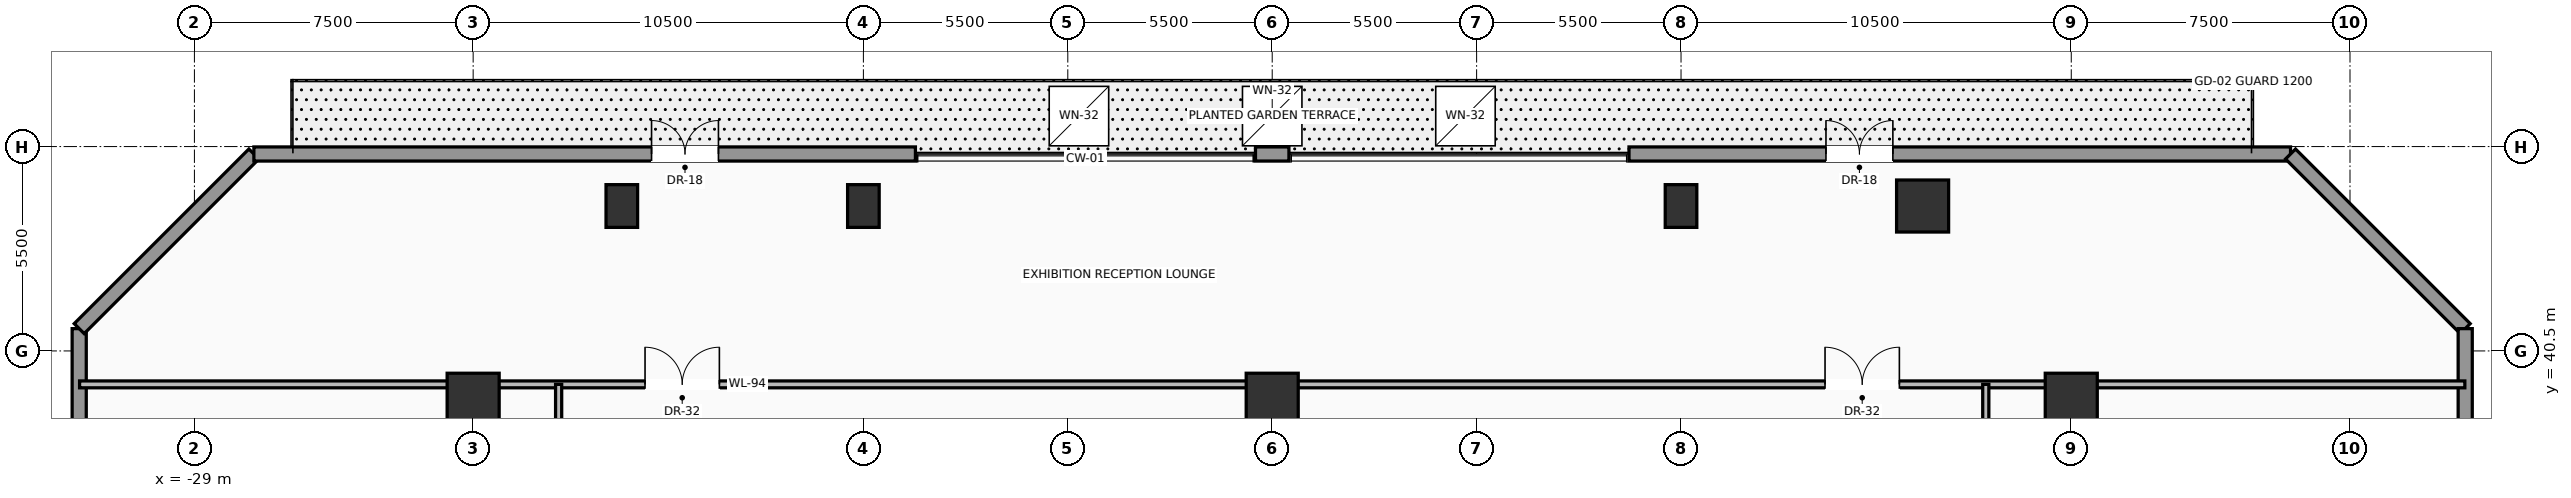
"""IFC4 building model, lengths in metres.
Left out: names, types, materials, properties, quantities, classifications, styles, units other than length and angle.
Written with IfcOpenShell. Run it as: python <this file> out.ifc"""

import sys

from ifc_helpers import new_model, si_unit, direction, frame, frame_2d, origin, origin_2d, place, context, subcontext, project, spatial, rectangle, hollow_rectangle, extrude, source, transform, mapped, element, fill, save


model = new_model("IFC4")
c1 = context("Model", 3, precision=1e-05, world=origin(), true_north=direction((0.0, 1.0)))
c2 = subcontext(c1, "Body", "Model", "MODEL_VIEW")
j1 = project(units=[si_unit("LENGTHUNIT", "METRE"), si_unit("PLANEANGLEUNIT", "RADIAN")], contexts=[c1])
p1 = place(None, origin())
s1 = spatial("IfcSite", under=j1, at=p1, CompositionType="ELEMENT")
p2 = place(p1, origin())
s2 = spatial("IfcBuilding", under=s1, at=p2, CompositionType="ELEMENT")
p3 = place(p2, frame((0.0, 0.0, 11.0)))
s3 = spatial("IfcBuildingStorey", under=s2, at=p3, CompositionType="ELEMENT", Elevation=11.0)
m1 = source(origin(), c2, "Body", "SweptSolid", [
    extrude(hollow_rectangle(XDim=1.4, YDim=1.4, WallThickness=0.07, at=origin_2d()), origin(), (0.0, 0.0, 1.0), 5.5),
])
p4 = place(p3, frame((-21.5, 39.2, 0.0), z_axis=(0.0, 0.0, 1.0), x_axis=(1.0, 0.0, 0.0)))
e1 = element("IfcColumn", 1, at=p4, inside=s3, PredefinedType="COLUMN", context=c2, shape_type="MappedRepresentation", body=[
    mapped(m1, transform((0.0, 0.0, 0.0), scale=1.0)),
])
m2 = source(origin(), c2, "Body", "SweptSolid", [
    extrude(rectangle(XDim=0.85, YDim=1.15, at=origin_2d()), origin(), (0.0, 0.0, 1.0), 5.5),
])
p5 = place(p3, frame((-11.0, 44.4, 0.0), z_axis=(0.0, 0.0, 1.0), x_axis=(1.0, 0.0, 0.0)))
e2 = element("IfcColumn", 2, at=p5, inside=s3, PredefinedType="COLUMN", context=c2, shape_type="MappedRepresentation", body=[
    mapped(m2, transform((0.0, 0.0, 0.0), scale=1.0)),
])
p6 = place(p3, frame((0.0, 39.2, 0.0), z_axis=(0.0, 0.0, 1.0), x_axis=(1.0, 0.0, 0.0)))
e3 = element("IfcColumn", 3, at=p6, inside=s3, PredefinedType="COLUMN", context=c2, shape_type="MappedRepresentation", body=[
    mapped(m1, transform((0.0, 0.0, 0.0), scale=1.0)),
])
p7 = place(p3, frame((11.0, 44.4, 0.0), z_axis=(0.0, 0.0, 1.0), x_axis=(1.0, 0.0, 0.0)))
e4 = element("IfcColumn", 4, at=p7, inside=s3, PredefinedType="COLUMN", context=c2, shape_type="MappedRepresentation", body=[
    mapped(m2, transform((0.0, 0.0, 0.0), scale=1.0)),
])
p8 = place(p3, frame((21.5, 39.2, 0.0), z_axis=(0.0, 0.0, 1.0), x_axis=(1.0, 0.0, 0.0)))
e5 = element("IfcColumn", 5, at=p8, inside=s3, PredefinedType="COLUMN", context=c2, shape_type="MappedRepresentation", body=[
    mapped(m1, transform((0.0, 0.0, 0.0), scale=1.0)),
])
p9 = place(p3, frame((-17.5, 44.4, 0.0), z_axis=(0.0, 0.0, 1.0), x_axis=(1.0, 0.0, 0.0)))
e6 = element("IfcColumn", 6, at=p9, inside=s3, PredefinedType="COLUMN", context=c2, shape_type="MappedRepresentation", body=[
    mapped(m2, transform((0.0, 0.0, 0.0), scale=1.0)),
])
p10 = place(p3, frame((17.5, 44.4, 0.0), z_axis=(0.0, 0.0, 1.0), x_axis=(1.0, 0.0, 0.0)))
e7 = element("IfcColumn", 7, at=p10, inside=s3, PredefinedType="COLUMN", context=c2, shape_type="MappedRepresentation", body=[
    mapped(m1, transform((0.0, 0.0, 0.0), scale=1.0)),
])
p11 = place(p3, frame((-32.1, 4.7, 0.0), z_axis=(0.0, 0.0, 1.0), x_axis=(0.0, 1.0, 0.0)))
e8 = element("IfcWall", 8, at=p11, inside=s3, PredefinedType="SOLIDWALL", context=c2, shape_type="SweptSolid", body=[
    extrude(rectangle(XDim=36.4, YDim=0.38, at=frame_2d((18.2, 0.0))), origin(), (0.0, 0.0, 1.0), 4.125),
])
p12 = place(p11, frame((16.9, 0.0, 0.95)))
e9 = element("IfcOpeningElement", 9, at=p12, cuts=e8, PredefinedType="OPENING", context=c2, shape_type="SweptSolid", body=[
    extrude(rectangle(XDim=1.8, YDim=2.4, at=frame_2d((0.9, 1.2))), frame((0.0, 0.2, 0.0), z_axis=(0.0, -1.0, 0.0), x_axis=(1.0, 0.0, 0.0)), (0.0, 0.0, 1.0), 0.4),
])
p13 = place(p11, frame((27.4, 0.0, 0.95)))
e10 = element("IfcOpeningElement", 10, at=p13, cuts=e8, PredefinedType="OPENING", context=c2, shape_type="SweptSolid", body=[
    extrude(rectangle(XDim=1.8, YDim=2.4, at=frame_2d((0.9, 1.2))), frame((0.0, 0.2, 0.0), z_axis=(0.0, -1.0, 0.0), x_axis=(1.0, 0.0, 0.0)), (0.0, 0.0, 1.0), 0.4),
])
p14 = place(p3, frame((-32.1, 41.1, 0.0), z_axis=(0.0, 0.0, 1.0), x_axis=(0.707125145927, 0.707088415969, 0.0)))
e11 = element("IfcWall", 11, at=p14, inside=s3, PredefinedType="SOLIDWALL", context=c2, shape_type="SweptSolid", body=[
    extrude(rectangle(XDim=6.647, YDim=0.38, at=frame_2d((3.323, 0.0))), origin(), (0.0, 0.0, 1.0), 4.125),
])
p15 = place(p3, frame((-0.45, 45.8, 0.0), z_axis=(0.0, 0.0, 1.0), x_axis=(1.0, 0.0, 0.0)))
e12 = element("IfcWall", 12, at=p15, inside=s3, PredefinedType="SOLIDWALL", context=c2, shape_type="SweptSolid", body=[
    extrude(rectangle(XDim=0.9, YDim=0.38, at=frame_2d((0.45, 0.0))), origin(), (0.0, 0.0, 1.0), 4.125),
])
p16 = place(p3, frame((-27.4, 45.8, 0.0), z_axis=(0.0, 0.0, 1.0), x_axis=(1.0, 0.0, 0.0)))
e13 = element("IfcWall", 13, at=p16, inside=s3, PredefinedType="SOLIDWALL", context=c2, shape_type="SweptSolid", body=[
    extrude(rectangle(XDim=17.8, YDim=0.38, at=frame_2d((8.9, 0.0))), origin(), (0.0, 0.0, 1.0), 4.125),
])
p17 = place(p16, frame((10.7, 0.0, 0.0)))
e14 = element("IfcOpeningElement", 14, at=p17, cuts=e13, PredefinedType="OPENING", context=c2, shape_type="SweptSolid", body=[
    extrude(rectangle(XDim=1.8, YDim=2.4, at=frame_2d((0.9, 1.2))), frame((0.0, 0.2, 0.0), z_axis=(0.0, -1.0, 0.0), x_axis=(1.0, 0.0, 0.0)), (0.0, 0.0, 1.0), 0.4),
])
p18 = place(p3, frame((9.6, 45.8, 0.0), z_axis=(0.0, 0.0, 1.0), x_axis=(1.0, 0.0, 0.0)))
e15 = element("IfcWall", 15, at=p18, inside=s3, PredefinedType="SOLIDWALL", context=c2, shape_type="SweptSolid", body=[
    extrude(rectangle(XDim=17.8, YDim=0.38, at=frame_2d((8.9, 0.0))), origin(), (0.0, 0.0, 1.0), 4.125),
])
p19 = place(p18, frame((5.3, 0.0, 0.0)))
e16 = element("IfcOpeningElement", 16, at=p19, cuts=e15, PredefinedType="OPENING", context=c2, shape_type="SweptSolid", body=[
    extrude(rectangle(XDim=1.8, YDim=2.4, at=frame_2d((0.9, 1.2))), frame((0.0, 0.2, 0.0), z_axis=(0.0, -1.0, 0.0), x_axis=(1.0, 0.0, 0.0)), (0.0, 0.0, 1.0), 0.4),
])
p20 = place(p3, frame((27.4, 45.8, 0.0), z_axis=(0.0, 0.0, 1.0), x_axis=(0.707125145927, -0.707088415969, 0.0)))
e17 = element("IfcWall", 17, at=p20, inside=s3, PredefinedType="SOLIDWALL", context=c2, shape_type="SweptSolid", body=[
    extrude(rectangle(XDim=6.647, YDim=0.38, at=frame_2d((3.323, 0.0))), origin(), (0.0, 0.0, 1.0), 4.125),
])
p21 = place(p3, frame((32.1, 41.1, 0.0), z_axis=(0.0, 0.0, 1.0), x_axis=(0.0, -1.0, 0.0)))
e18 = element("IfcWall", 18, at=p21, inside=s3, PredefinedType="SOLIDWALL", context=c2, shape_type="SweptSolid", body=[
    extrude(rectangle(XDim=36.4, YDim=0.38, at=frame_2d((18.2, 0.0))), origin(), (0.0, 0.0, 1.0), 4.125),
])
p22 = place(p21, frame((17.7, 0.0, 0.95)))
e19 = element("IfcOpeningElement", 19, at=p22, cuts=e18, PredefinedType="OPENING", context=c2, shape_type="SweptSolid", body=[
    extrude(rectangle(XDim=1.8, YDim=2.4, at=frame_2d((0.9, 1.2))), frame((0.0, 0.2, 0.0), z_axis=(0.0, -1.0, 0.0), x_axis=(1.0, 0.0, 0.0)), (0.0, 0.0, 1.0), 0.4),
])
p23 = place(p21, frame((7.2, 0.0, 0.95)))
e20 = element("IfcOpeningElement", 20, at=p23, cuts=e18, PredefinedType="OPENING", context=c2, shape_type="SweptSolid", body=[
    extrude(rectangle(XDim=1.8, YDim=2.4, at=frame_2d((0.9, 1.2))), frame((0.0, 0.2, 0.0), z_axis=(0.0, -1.0, 0.0), x_axis=(1.0, 0.0, 0.0)), (0.0, 0.0, 1.0), 0.4),
])
p24 = place(p3, frame((-32.09, 39.6, 0.0), z_axis=(0.0, 0.0, 1.0), x_axis=(1.0, 0.0, 0.0)))
e21 = element("IfcWall", 21, at=p24, inside=s3, PredefinedType="PARTITIONING", context=c2, shape_type="SweptSolid", body=[
    extrude(rectangle(XDim=64.18, YDim=0.185, at=frame_2d((32.09, 0.0))), origin(), (0.0, 0.0, 1.0), 4.137),
])
p25 = place(p24, frame((15.215, 0.0, 0.0)))
e22 = element("IfcOpeningElement", 22, at=p25, cuts=e21, PredefinedType="OPENING", context=c2, shape_type="SweptSolid", body=[
    extrude(rectangle(XDim=2.0, YDim=2.4, at=frame_2d((1.0, 1.2))), frame((0.0, 0.103, 0.0), z_axis=(0.0, -1.0, 0.0), x_axis=(1.0, 0.0, 0.0)), (0.0, 0.0, 1.0), 0.205),
])
p26 = place(p24, frame((46.965, 0.0, 0.0)))
e23 = element("IfcOpeningElement", 23, at=p26, cuts=e21, PredefinedType="OPENING", context=c2, shape_type="SweptSolid", body=[
    extrude(rectangle(XDim=2.0, YDim=2.4, at=frame_2d((1.0, 1.2))), frame((0.0, 0.103, 0.0), z_axis=(0.0, -1.0, 0.0), x_axis=(1.0, 0.0, 0.0)), (0.0, 0.0, 1.0), 0.205),
])
p27 = place(p3, frame((-19.2, 19.2, 0.0), z_axis=(0.0, 0.0, 1.0), x_axis=(0.0, 1.0, 0.0)))
e24 = element("IfcWall", 24, at=p27, inside=s3, PredefinedType="PARTITIONING", context=c2, shape_type="SweptSolid", body=[
    extrude(rectangle(XDim=20.4, YDim=0.165, at=frame_2d((10.2, 0.0))), origin(), (0.0, 0.0, 1.0), 4.137),
])
p28 = place(p27, frame((8.464, 0.0, 0.0)))
e25 = element("IfcOpeningElement", 25, at=p28, cuts=e24, PredefinedType="OPENING", context=c2, shape_type="SweptSolid", body=[
    extrude(rectangle(XDim=1.5, YDim=2.25, at=frame_2d((0.75, 1.125))), frame((0.0, 0.093, 0.0), z_axis=(0.0, -1.0, 0.0), x_axis=(1.0, 0.0, 0.0)), (0.0, 0.0, 1.0), 0.185),
])
p29 = place(p3, frame((19.2, 19.2, 0.0), z_axis=(0.0, 0.0, 1.0), x_axis=(0.0, 1.0, 0.0)))
e26 = element("IfcWall", 26, at=p29, inside=s3, PredefinedType="PARTITIONING", context=c2, shape_type="SweptSolid", body=[
    extrude(rectangle(XDim=20.4, YDim=0.165, at=frame_2d((10.2, 0.0))), origin(), (0.0, 0.0, 1.0), 4.137),
])
p30 = place(p29, frame((8.464, 0.0, 0.0)))
e27 = element("IfcOpeningElement", 27, at=p30, cuts=e26, PredefinedType="OPENING", context=c2, shape_type="SweptSolid", body=[
    extrude(rectangle(XDim=1.5, YDim=2.25, at=frame_2d((0.75, 1.125))), frame((0.0, 0.093, 0.0), z_axis=(0.0, -1.0, 0.0), x_axis=(1.0, 0.0, 0.0)), (0.0, 0.0, 1.0), 0.185),
])
p31 = place(p3, frame((0.0, 19.2, 0.0), z_axis=(0.0, 0.0, 1.0), x_axis=(0.0, 1.0, 0.0)))
e28 = element("IfcWall", 28, at=p31, inside=s3, PredefinedType="MOVABLE", context=c2, shape_type="SweptSolid", body=[
    extrude(rectangle(XDim=20.4, YDim=0.155, at=frame_2d((10.2, 0.0))), origin(), (0.0, 0.0, 1.0), 4.137),
])
p32 = place(p31, frame((9.45, 0.0, 0.0)))
e29 = element("IfcOpeningElement", 29, at=p32, cuts=e28, PredefinedType="OPENING", context=c2, shape_type="SweptSolid", body=[
    extrude(rectangle(XDim=1.5, YDim=2.25, at=frame_2d((0.75, 1.125))), frame((0.0, 0.087, 0.0), z_axis=(0.0, -1.0, 0.0), x_axis=(1.0, 0.0, 0.0)), (0.0, 0.0, 1.0), 0.175),
])
m3 = source(origin(), c2, "Body", "SweptSolid", [
    extrude(rectangle(XDim=1.8, YDim=2.4, at=frame_2d((0.9, 1.2))), frame((0.0, 0.025, 0.0), z_axis=(0.0, -1.0, 0.0), x_axis=(1.0, 0.0, 0.0)), (0.0, 0.0, 1.0), 0.05),
])
p33 = place(p17, origin())
e30 = element("IfcDoor", 30, at=p33, inside=s3, OperationType="DOUBLE_DOOR_SINGLE_SWING", PredefinedType="DOOR", context=c2, shape_type="MappedRepresentation", body=[
    mapped(m3, transform((0.0, 0.0, 0.0), scale=1.0)),
])
fill(e14, e30)
p34 = place(p19, origin())
e31 = element("IfcDoor", 31, at=p34, inside=s3, OperationType="DOUBLE_DOOR_SINGLE_SWING", PredefinedType="DOOR", context=c2, shape_type="MappedRepresentation", body=[
    mapped(m3, transform((0.0, 0.0, 0.0), scale=1.0)),
])
fill(e16, e31)
p35 = place(p3, frame((0.0, 0.0, -0.33)))
p36 = place(p35, frame((-5.2, 46.82, 0.28)))
e32 = element("IfcWindow", 32, at=p36, inside=s3, PartitioningType="SINGLE_PANEL", PredefinedType="SKYLIGHT", context=c2, shape_type="SweptSolid", body=[
    extrude(rectangle(XDim=1.6, YDim=1.6, at=origin_2d()), origin(), (0.0, 0.0, 1.0), 0.05),
])
p37 = place(p35, frame((0.0, 46.82, 0.28)))
e33 = element("IfcWindow", 33, at=p37, inside=s3, PartitioningType="SINGLE_PANEL", PredefinedType="SKYLIGHT", context=c2, shape_type="SweptSolid", body=[
    extrude(rectangle(XDim=1.6, YDim=1.6, at=origin_2d()), origin(), (0.0, 0.0, 1.0), 0.05),
])
p38 = place(p35, frame((5.2, 46.82, 0.28)))
e34 = element("IfcWindow", 34, at=p38, inside=s3, PartitioningType="SINGLE_PANEL", PredefinedType="SKYLIGHT", context=c2, shape_type="SweptSolid", body=[
    extrude(rectangle(XDim=1.6, YDim=1.6, at=origin_2d()), origin(), (0.0, 0.0, 1.0), 0.05),
])
m4 = source(origin(), c2, "Body", "SweptSolid", [
    extrude(rectangle(XDim=2.0, YDim=2.4, at=frame_2d((1.0, 1.2))), frame((0.0, 0.025, 0.0), z_axis=(0.0, -1.0, 0.0), x_axis=(1.0, 0.0, 0.0)), (0.0, 0.0, 1.0), 0.05),
])
p39 = place(p25, origin())
e35 = element("IfcDoor", 35, at=p39, inside=s3, OperationType="DOUBLE_DOOR_SINGLE_SWING", PredefinedType="DOOR", context=c2, shape_type="MappedRepresentation", body=[
    mapped(m4, transform((0.0, 0.0, 0.0), scale=1.0)),
])
fill(e22, e35)
p40 = place(p26, origin())
e36 = element("IfcDoor", 36, at=p40, inside=s3, OperationType="DOUBLE_DOOR_SINGLE_SWING", PredefinedType="DOOR", context=c2, shape_type="MappedRepresentation", body=[
    mapped(m4, transform((0.0, 0.0, 0.0), scale=1.0)),
])
fill(e23, e36)
save(model, sys.argv[1])
